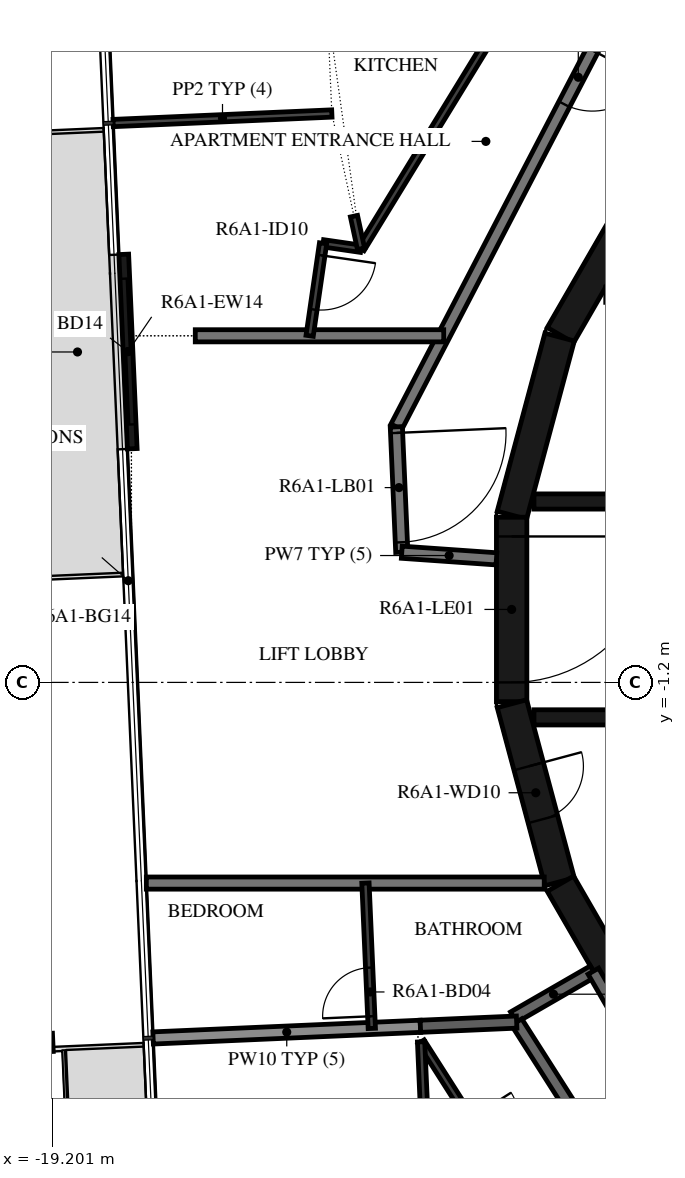
"""IFC4 building model, lengths in metres.
Left out: names, types, materials, properties, quantities, classifications, styles, units other than length and angle.
Written with IfcOpenShell. Run it as: python <this file> out.ifc"""

import sys

from ifc_helpers import new_model, si_unit, direction, frame, frame_2d, origin, origin_2d, place, context, subcontext, project, spatial, rectangle, i_section, extrude, element, fill, save


model = new_model("IFC4")
c1 = context("Model", 3, precision=1e-05, world=origin(), true_north=direction((0.0, 1.0)))
c2 = subcontext(c1, "Body", "Model", "MODEL_VIEW")
j1 = project(units=[si_unit("LENGTHUNIT", "METRE"), si_unit("PLANEANGLEUNIT", "RADIAN")], contexts=[c1])
p1 = place(None, origin())
s1 = spatial("IfcSite", under=j1, at=p1, CompositionType="ELEMENT")
p2 = place(p1, origin())
s2 = spatial("IfcBuilding", under=s1, at=p2, CompositionType="ELEMENT")
p3 = place(p2, frame((0.0, 0.0, 230.2)))
s3 = spatial("IfcBuildingStorey", under=s2, at=p3, CompositionType="ELEMENT", Elevation=230.2)
p4 = place(p3, frame((-19.642, -7.139, -0.38), z_axis=(0.0, 0.0, 1.0), x_axis=(-0.043619010384, 0.999048238041, 0.0)))
e1 = element("IfcColumn", 1, at=p4, inside=s3, PredefinedType="COLUMN", context=c2, shape_type="SweptSolid", body=[
    extrude(i_section(OverallWidth=0.3, OverallDepth=0.9, WebThickness=0.019, FlangeThickness=0.035, FilletRadius=0.03, at=origin_2d()), origin(), (0.0, 0.0, 1.0), 3.5),
])
p5 = place(p3, frame((-18.026, 5.839, 0.0), z_axis=(0.0, 0.0, 1.0), x_axis=(0.043563034632, -0.999050680403, 0.0)))
e2 = element("IfcWall", 2, at=p5, inside=s3, PredefinedType="STANDARD", context=c2, shape_type="SweptSolid", body=[
    extrude(rectangle(XDim=3.2, YDim=0.16, at=frame_2d((1.6, 0.0))), origin(), (0.0, 0.0, 1.0), 3.12),
])
p6 = place(p5, frame((0.4, 0.0, 0.0)))
e3 = element("IfcOpeningElement", 3, at=p6, cuts=e2, PredefinedType="OPENING", context=c2, shape_type="SweptSolid", body=[
    extrude(rectangle(XDim=2.4, YDim=2.4, at=frame_2d((1.2, 1.2))), frame((0.0, 0.09, 0.0), z_axis=(0.0, -1.0, 0.0), x_axis=(1.0, 0.0, 0.0)), (0.0, 0.0, 1.0), 0.18),
])
for number, where, z_axis, x_axis in (
    (4, (-9.329, 7.137, 0.0), (0.0, 0.0, 1.0), (-0.5, -0.866, 0.0)),
    (5, (-10.858, 4.479, 0.0), (0.0, 0.0, 1.0), (-0.259, -0.966, 0.0)),
):
    element("IfcWall", number, at=place(p3, frame(where, z_axis=z_axis, x_axis=x_axis)), inside=s3, PredefinedType="SHEAR", context=c2, shape_type="SweptSolid", body=[
        extrude(rectangle(XDim=3.033, YDim=0.5, at=frame_2d((1.516, 0.0))), origin(), (0.0, 0.0, 1.0), 3.12),
    ])
p7 = place(p3, frame((-11.647, 1.516, 0.0), z_axis=(0.0, 0.0, 1.0), x_axis=(0.0, -1.0, 0.0)))
e6 = element("IfcWall", 6, at=p7, inside=s3, PredefinedType="SHEAR", context=c2, shape_type="SweptSolid", body=[
    extrude(rectangle(XDim=3.033, YDim=0.5, at=frame_2d((1.516, 0.0))), origin(), (0.0, 0.0, 1.0), 3.12),
])
p8 = place(p7, frame((0.316, 0.0, 0.0)))
e7 = element("IfcOpeningElement", 7, at=p8, cuts=e6, PredefinedType="OPENING", context=c2, shape_type="SweptSolid", body=[
    extrude(rectangle(XDim=2.4, YDim=2.1, at=frame_2d((1.2, 1.05))), frame((0.0, 0.26, 0.0), z_axis=(0.0, -1.0, 0.0), x_axis=(1.0, 0.0, 0.0)), (0.0, 0.0, 1.0), 0.52),
])
p9 = place(p3, frame((-11.643, -1.55, 0.0), z_axis=(0.0, 0.0, 1.0), x_axis=(0.258734743916, -0.965948410781, 0.0)))
e8 = element("IfcWall", 8, at=p9, inside=s3, PredefinedType="SHEAR", context=c2, shape_type="SweptSolid", body=[
    extrude(rectangle(XDim=3.033, YDim=0.5, at=frame_2d((1.516, 0.0))), origin(), (0.0, 0.0, 1.0), 3.12),
])
p10 = place(p9, frame((1.066, 0.0, 0.0)))
e9 = element("IfcOpeningElement", 9, at=p10, cuts=e8, PredefinedType="OPENING", context=c2, shape_type="SweptSolid", body=[
    extrude(rectangle(XDim=0.9, YDim=2.1, at=frame_2d((0.45, 1.05))), frame((0.0, 0.26, 0.0), z_axis=(0.0, -1.0, 0.0), x_axis=(1.0, 0.0, 0.0)), (0.0, 0.0, 1.0), 0.52),
])
p11 = place(p3, frame((-10.845, -4.51, 0.0), z_axis=(0.0, 0.0, 1.0), x_axis=(0.500087131594, -0.865975092491, 0.0)))
e10 = element("IfcWall", 10, at=p11, inside=s3, PredefinedType="SHEAR", context=c2, shape_type="SweptSolid", body=[
    extrude(rectangle(XDim=3.033, YDim=0.5, at=frame_2d((1.516, 0.0))), origin(), (0.0, 0.0, 1.0), 3.12),
])
p12 = place(p3, frame((-11.28, 1.775, 0.0), z_axis=(0.0, 0.0, 1.0), x_axis=(1.0, 0.0, 0.0)))
e11 = element("IfcWall", 11, at=p12, inside=s3, PredefinedType="SHEAR", context=c2, shape_type="SweptSolid", body=[
    extrude(rectangle(XDim=14.38, YDim=0.25, at=frame_2d((7.19, 0.0))), origin(), (0.0, 0.0, 1.0), 3.12),
])
p13 = place(p12, frame((10.73, 0.0, 0.0)))
e12 = element("IfcOpeningElement", 12, at=p13, cuts=e11, PredefinedType="OPENING", context=c2, shape_type="SweptSolid", body=[
    extrude(rectangle(XDim=1.1, YDim=2.1, at=frame_2d((0.55, 1.05))), frame((0.0, 0.135, 0.0), z_axis=(0.0, -1.0, 0.0), x_axis=(1.0, 0.0, 0.0)), (0.0, 0.0, 1.0), 0.27),
])
p14 = place(p12, frame((12.88, 0.0, 0.0)))
e13 = element("IfcOpeningElement", 13, at=p14, cuts=e11, PredefinedType="OPENING", context=c2, shape_type="SweptSolid", body=[
    extrude(rectangle(XDim=1.1, YDim=2.1, at=frame_2d((0.55, 1.05))), frame((0.0, 0.135, 0.0), z_axis=(0.0, -1.0, 0.0), x_axis=(1.0, 0.0, 0.0)), (0.0, 0.0, 1.0), 0.27),
])
p15 = place(p12, frame((3.305, 0.0, 0.0)))
e14 = element("IfcOpeningElement", 14, at=p15, cuts=e11, PredefinedType="OPENING", context=c2, shape_type="SweptSolid", body=[
    extrude(rectangle(XDim=0.9, YDim=2.1, at=frame_2d((0.45, 1.05))), frame((0.0, 0.135, 0.0), z_axis=(0.0, -1.0, 0.0), x_axis=(1.0, 0.0, 0.0)), (0.0, 0.0, 1.0), 0.27),
])
p16 = place(p12, frame((7.605, 0.0, 0.0)))
e15 = element("IfcOpeningElement", 15, at=p16, cuts=e11, PredefinedType="OPENING", context=c2, shape_type="SweptSolid", body=[
    extrude(rectangle(XDim=0.9, YDim=2.1, at=frame_2d((0.45, 1.05))), frame((0.0, 0.135, 0.0), z_axis=(0.0, -1.0, 0.0), x_axis=(1.0, 0.0, 0.0)), (0.0, 0.0, 1.0), 0.27),
])
p17 = place(p3, frame((-11.28, -1.775, 0.0), z_axis=(0.0, 0.0, 1.0), x_axis=(1.0, 0.0, 0.0)))
e16 = element("IfcWall", 16, at=p17, inside=s3, PredefinedType="SHEAR", context=c2, shape_type="SweptSolid", body=[
    extrude(rectangle(XDim=14.38, YDim=0.25, at=frame_2d((7.19, 0.0))), origin(), (0.0, 0.0, 1.0), 3.12),
])
p18 = place(p17, frame((12.88, 0.0, 0.0)))
e17 = element("IfcOpeningElement", 17, at=p18, cuts=e16, PredefinedType="OPENING", context=c2, shape_type="SweptSolid", body=[
    extrude(rectangle(XDim=1.1, YDim=2.1, at=frame_2d((0.55, 1.05))), frame((0.0, 0.135, 0.0), z_axis=(0.0, -1.0, 0.0), x_axis=(1.0, 0.0, 0.0)), (0.0, 0.0, 1.0), 0.27),
])
p19 = place(p17, frame((7.605, 0.0, 0.0)))
e18 = element("IfcOpeningElement", 18, at=p19, cuts=e16, PredefinedType="OPENING", context=c2, shape_type="SweptSolid", body=[
    extrude(rectangle(XDim=0.9, YDim=2.1, at=frame_2d((0.45, 1.05))), frame((0.0, 0.135, 0.0), z_axis=(0.0, -1.0, 0.0), x_axis=(1.0, 0.0, 0.0)), (0.0, 0.0, 1.0), 0.27),
])
p20 = place(p17, frame((10.83, 0.0, 0.0)))
e19 = element("IfcOpeningElement", 19, at=p20, cuts=e16, PredefinedType="OPENING", context=c2, shape_type="SweptSolid", body=[
    extrude(rectangle(XDim=0.9, YDim=2.1, at=frame_2d((0.45, 1.05))), frame((0.0, 0.135, 0.0), z_axis=(0.0, -1.0, 0.0), x_axis=(1.0, 0.0, 0.0)), (0.0, 0.0, 1.0), 0.27),
])
p21 = place(p3, frame((-10.228, 9.372, 0.0), z_axis=(0.0, 0.0, 1.0), x_axis=(-0.461759464021, -0.887005184532, 0.0)))
e20 = element("IfcWall", 20, at=p21, inside=s3, PredefinedType="STANDARD", context=c2, shape_type="SweptSolid", body=[
    extrude(rectangle(XDim=7.181, YDim=0.2, at=frame_2d((3.591, 0.0))), origin(), (0.0, 0.0, 1.0), 3.12),
])
p22 = place(p21, frame((0.2, 0.0, 0.0)))
e21 = element("IfcOpeningElement", 21, at=p22, cuts=e20, PredefinedType="OPENING", context=c2, shape_type="SweptSolid", body=[
    extrude(rectangle(XDim=1.0, YDim=2.1, at=frame_2d((0.5, 1.05))), frame((0.0, 0.11, 0.0), z_axis=(0.0, -1.0, 0.0), x_axis=(1.0, 0.0, 0.0)), (0.0, 0.0, 1.0), 0.22),
])
p23 = place(p3, frame((-13.544, 3.003, 0.0), z_axis=(0.0, 0.0, 1.0), x_axis=(0.043652842459, -0.99904676034, 0.0)))
e22 = element("IfcWall", 22, at=p23, inside=s3, PredefinedType="STANDARD", context=c2, shape_type="SweptSolid", body=[
    extrude(rectangle(XDim=2.064, YDim=0.2, at=frame_2d((1.032, 0.0))), origin(), (0.0, 0.0, 1.0), 3.12),
])
p24 = place(p23, frame((0.1, 0.0, 0.0)))
e23 = element("IfcOpeningElement", 23, at=p24, cuts=e22, PredefinedType="OPENING", context=c2, shape_type="SweptSolid", body=[
    extrude(rectangle(XDim=1.8, YDim=2.1, at=frame_2d((0.9, 1.05))), frame((0.0, 0.11, 0.0), z_axis=(0.0, -1.0, 0.0), x_axis=(1.0, 0.0, 0.0)), (0.0, 0.0, 1.0), 0.22),
])
p25 = place(p3, frame((-13.454, 0.941, 0.0), z_axis=(0.0, 0.0, 1.0), x_axis=(0.99755155062, -0.069934997354, 0.0)))
e24 = element("IfcWall", 24, at=p25, inside=s3, PredefinedType="STANDARD", context=c2, shape_type="SweptSolid", body=[
    extrude(rectangle(XDim=1.561, YDim=0.2, at=frame_2d((0.78, 0.0))), origin(), (0.0, 0.0, 1.0), 3.12),
])
p26 = place(p3, frame((-10.303, -5.949, 0.0), z_axis=(0.0, 0.0, 1.0), x_axis=(-0.866043382451, -0.499968858743, 0.0)))
e25 = element("IfcWall", 25, at=p26, inside=s3, PredefinedType="STANDARD", context=c2, shape_type="SweptSolid", body=[
    extrude(rectangle(XDim=1.515, YDim=0.2, at=frame_2d((0.758, 0.0))), origin(), (0.0, 0.0, 1.0), 3.12),
])
p27 = place(p3, frame((-9.52, -7.305, 0.0), z_axis=(0.0, 0.0, 1.0), x_axis=(-0.500028278809, 0.866009076391, 0.0)))
e26 = element("IfcWall", 26, at=p27, inside=s3, PredefinedType="STANDARD", context=c2, shape_type="SweptSolid", body=[
    extrude(rectangle(XDim=1.566, YDim=0.2, at=frame_2d((0.783, 0.0))), origin(), (0.0, 0.0, 1.0), 3.12),
])
p28 = place(p3, frame((-11.565, -6.786, 0.0), z_axis=(0.0, 0.0, 1.0), x_axis=(0.537297327359, -0.843392898958, 0.0)))
e27 = element("IfcWall", 27, at=p28, inside=s3, PredefinedType="STANDARD", context=c2, shape_type="SweptSolid", body=[
    extrude(rectangle(XDim=4.081, YDim=0.2, at=frame_2d((2.041, 0.0))), origin(), (0.0, 0.0, 1.0), 3.12),
])
p29 = place(p3, frame((-12.764, 4.5, 0.0), z_axis=(0.0, 0.0, 1.0), x_axis=(-1.0, 0.0, 0.0)))
e28 = element("IfcWall", 28, at=p29, inside=s3, PredefinedType="STANDARD", context=c2, shape_type="SweptSolid", body=[
    extrude(rectangle(XDim=4.086, YDim=0.2, at=frame_2d((2.043, 0.0))), origin(), (0.0, 0.0, 1.0), 3.12),
])
p30 = place(p3, frame((-17.655, -4.5, 0.0), z_axis=(0.0, 0.0, 1.0), x_axis=(1.0, 0.0, 0.0)))
e29 = element("IfcWall", 29, at=p30, inside=s3, PredefinedType="STANDARD", context=c2, shape_type="SweptSolid", body=[
    extrude(rectangle(XDim=6.543, YDim=0.2, at=frame_2d((3.272, 0.0))), origin(), (0.0, 0.0, 1.0), 3.12),
])
p31 = place(p3, frame((-17.544, -7.047, 0.0), z_axis=(0.0, 0.0, 1.0), x_axis=(0.99904608111, 0.043668384662, 0.0)))
e30 = element("IfcWall", 30, at=p31, inside=s3, PredefinedType="STANDARD", context=c2, shape_type="SweptSolid", body=[
    extrude(rectangle(XDim=4.4, YDim=0.2, at=frame_2d((2.2, 0.0))), origin(), (0.0, 0.0, 1.0), 2.73),
])
p32 = place(p3, frame((-13.148, -6.855, 0.0), z_axis=(0.0, 0.0, 1.0), x_axis=(0.999048583464, 0.043611098121, 0.0)))
e31 = element("IfcWall", 31, at=p32, inside=s3, PredefinedType="STANDARD", context=c2, shape_type="SweptSolid", body=[
    extrude(rectangle(XDim=1.584, YDim=0.2, at=frame_2d((0.792, 0.0))), origin(), (0.0, 0.0, 1.0), 3.12),
])
p33 = place(p3, frame((-11.373, 10.421, 0.0), z_axis=(0.0, 0.0, 1.0), x_axis=(-0.522435957358, -0.852678527031, 0.0)))
e32 = element("IfcWall", 32, at=p33, inside=s3, PredefinedType="PARTITIONING", context=c2, shape_type="SweptSolid", body=[
    extrude(rectangle(XDim=5.267, YDim=0.12, at=frame_2d((2.633, 0.0))), origin(), (0.0, 0.0, 1.0), 3.12),
])
p34 = place(p3, frame((-14.125, 5.931, 0.0), z_axis=(0.0, 0.0, 1.0), x_axis=(-0.989621518838, 0.143698467119, 0.0)))
e33 = element("IfcWall", 33, at=p34, inside=s3, PredefinedType="PARTITIONING", context=c2, shape_type="SweptSolid", body=[
    extrude(rectangle(XDim=0.63, YDim=0.12, at=frame_2d((0.315, 0.0))), origin(), (0.0, 0.0, 1.0), 3.12),
])
p35 = place(p3, frame((-14.748, 6.021, 0.0), z_axis=(0.0, 0.0, 1.0), x_axis=(-0.143888945672, -0.98959384159, 0.0)))
e34 = element("IfcWall", 34, at=p35, inside=s3, PredefinedType="PARTITIONING", context=c2, shape_type="SweptSolid", body=[
    extrude(rectangle(XDim=1.537, YDim=0.12, at=frame_2d((0.769, 0.0))), origin(), (0.0, 0.0, 1.0), 3.12),
])
p36 = place(p35, frame((0.2, 0.0, 0.0)))
e35 = element("IfcOpeningElement", 35, at=p36, cuts=e34, PredefinedType="OPENING", context=c2, shape_type="SweptSolid", body=[
    extrude(rectangle(XDim=0.9, YDim=2.1, at=frame_2d((0.45, 1.05))), frame((0.0, 0.07, 0.0), z_axis=(0.0, -1.0, 0.0), x_axis=(1.0, 0.0, 0.0)), (0.0, 0.0, 1.0), 0.14),
])
p37 = place(p3, frame((-14.24, 6.467, 0.0), z_axis=(0.0, 0.0, 1.0), x_axis=(0.210896225868, -0.977508456186, 0.0)))
e36 = element("IfcWall", 36, at=p37, inside=s3, PredefinedType="PARTITIONING", context=c2, shape_type="SweptSolid", body=[
    extrude(rectangle(XDim=0.549, YDim=0.12, at=frame_2d((0.274, 0.0))), origin(), (0.0, 0.0, 1.0), 3.12),
])
p38 = place(p3, frame((-18.201, 7.999, 0.0), z_axis=(0.0, 0.0, 1.0), x_axis=(0.999048850974, 0.043604969534, 0.0)))
e37 = element("IfcWall", 37, at=p38, inside=s3, PredefinedType="PARTITIONING", context=c2, shape_type="SweptSolid", body=[
    extrude(rectangle(XDim=3.6, YDim=0.12, at=frame_2d((1.8, 0.0))), origin(), (0.0, 0.0, 1.0), 2.73),
])
p39 = place(p3, frame((-13.947, -6.89, 0.0), z_axis=(0.0, 0.0, 1.0), x_axis=(-0.043680814195, 0.999045537737, 0.0)))
e38 = element("IfcWall", 38, at=p39, inside=s3, PredefinedType="PARTITIONING", context=c2, shape_type="SweptSolid", body=[
    extrude(rectangle(XDim=2.392, YDim=0.12, at=frame_2d((1.196, 0.0))), origin(), (0.0, 0.0, 1.0), 3.12),
])
p40 = place(p39, frame((0.2, 0.0, 0.0)))
e39 = element("IfcOpeningElement", 39, at=p40, cuts=e38, PredefinedType="OPENING", context=c2, shape_type="SweptSolid", body=[
    extrude(rectangle(XDim=0.8, YDim=2.1, at=frame_2d((0.4, 1.05))), frame((0.0, 0.07, 0.0), z_axis=(0.0, -1.0, 0.0), x_axis=(1.0, 0.0, 0.0)), (0.0, 0.0, 1.0), 0.14),
])
p41 = place(p3, frame((-13.137, -7.111, 0.0), z_axis=(0.0, 0.0, 1.0), x_axis=(0.537300549444, -0.843390846267, 0.0)))
e40 = element("IfcWall", 40, at=p41, inside=s3, PredefinedType="PARTITIONING", context=c2, shape_type="SweptSolid", body=[
    extrude(rectangle(XDim=5.054, YDim=0.12, at=frame_2d((2.527, 0.0))), origin(), (0.0, 0.0, 1.0), 3.12),
])
p42 = place(p41, frame((1.5, 0.0, 0.0)))
e41 = element("IfcOpeningElement", 41, at=p42, cuts=e40, PredefinedType="OPENING", context=c2, shape_type="SweptSolid", body=[
    extrude(rectangle(XDim=0.8, YDim=2.1, at=frame_2d((0.4, 1.05))), frame((0.0, 0.07, 0.0), z_axis=(0.0, -1.0, 0.0), x_axis=(1.0, 0.0, 0.0)), (0.0, 0.0, 1.0), 0.14),
])
p43 = place(p3, frame((-12.936, -11.703, 0.0), z_axis=(0.0, 0.0, 1.0), x_axis=(-0.043610108597, 0.999048626658, 0.0)))
e42 = element("IfcWall", 42, at=p43, inside=s3, PredefinedType="PARTITIONING", context=c2, shape_type="SweptSolid", body=[
    extrude(rectangle(XDim=4.596, YDim=0.12, at=frame_2d((2.298, 0.0))), origin(), (0.0, 0.0, 1.0), 3.12),
])
p44 = place(p6, origin())
e43 = element("IfcDoor", 43, at=p44, inside=s3, OperationType="DOUBLE_DOOR_SLIDING", PredefinedType="DOOR", context=c2, shape_type="SweptSolid", body=[
    extrude(rectangle(XDim=2.4, YDim=2.4, at=frame_2d((1.2, 1.2))), frame((0.0, 0.025, 0.0), z_axis=(0.0, -1.0, 0.0), x_axis=(1.0, 0.0, 0.0)), (0.0, 0.0, 1.0), 0.05),
])
fill(e3, e43)
p45 = place(p8, origin())
e44 = element("IfcDoor", 44, at=p45, inside=s3, OperationType="DOUBLE_DOOR_SINGLE_SWING", PredefinedType="DOOR", context=c2, shape_type="SweptSolid", body=[
    extrude(rectangle(XDim=2.4, YDim=2.1, at=frame_2d((1.2, 1.05))), frame((0.0, 0.025, 0.0), z_axis=(0.0, -1.0, 0.0), x_axis=(1.0, 0.0, 0.0)), (0.0, 0.0, 1.0), 0.05),
])
fill(e7, e44)
p46 = place(p10, origin())
e45 = element("IfcDoor", 45, at=p46, inside=s3, OperationType="SINGLE_SWING_RIGHT", PredefinedType="DOOR", context=c2, shape_type="SweptSolid", body=[
    extrude(rectangle(XDim=0.9, YDim=2.1, at=frame_2d((0.45, 1.05))), frame((0.0, 0.025, 0.0), z_axis=(0.0, -1.0, 0.0), x_axis=(1.0, 0.0, 0.0)), (0.0, 0.0, 1.0), 0.05),
])
fill(e9, e45)
p47 = place(p22, origin())
e46 = element("IfcDoor", 46, at=p47, inside=s3, OperationType="SINGLE_SWING_LEFT", PredefinedType="DOOR", context=c2, shape_type="SweptSolid", body=[
    extrude(rectangle(XDim=1.0, YDim=2.1, at=frame_2d((0.5, 1.05))), frame((0.0, 0.025, 0.0), z_axis=(0.0, -1.0, 0.0), x_axis=(1.0, 0.0, 0.0)), (0.0, 0.0, 1.0), 0.05),
])
fill(e21, e46)
p48 = place(p36, origin())
e47 = element("IfcDoor", 47, at=p48, inside=s3, OperationType="SINGLE_SWING_LEFT", PredefinedType="DOOR", context=c2, shape_type="SweptSolid", body=[
    extrude(rectangle(XDim=0.9, YDim=2.1, at=frame_2d((0.45, 1.05))), frame((0.0, 0.025, 0.0), z_axis=(0.0, -1.0, 0.0), x_axis=(1.0, 0.0, 0.0)), (0.0, 0.0, 1.0), 0.05),
])
fill(e35, e47)
p49 = place(p40, origin())
e48 = element("IfcDoor", 48, at=p49, inside=s3, OperationType="SINGLE_SWING_LEFT", PredefinedType="DOOR", context=c2, shape_type="SweptSolid", body=[
    extrude(rectangle(XDim=0.8, YDim=2.1, at=frame_2d((0.4, 1.05))), frame((0.0, 0.025, 0.0), z_axis=(0.0, -1.0, 0.0), x_axis=(1.0, 0.0, 0.0)), (0.0, 0.0, 1.0), 0.05),
])
fill(e39, e48)
p50 = place(p24, origin())
e49 = element("IfcDoor", 49, at=p50, inside=s3, OperationType="DOUBLE_DOOR_SINGLE_SWING", PredefinedType="DOOR", context=c2, shape_type="SweptSolid", body=[
    extrude(rectangle(XDim=1.8, YDim=2.1, at=frame_2d((0.9, 1.05))), frame((0.0, 0.025, 0.0), z_axis=(0.0, -1.0, 0.0), x_axis=(1.0, 0.0, 0.0)), (0.0, 0.0, 1.0), 0.05),
])
fill(e23, e49)
save(model, sys.argv[1])
